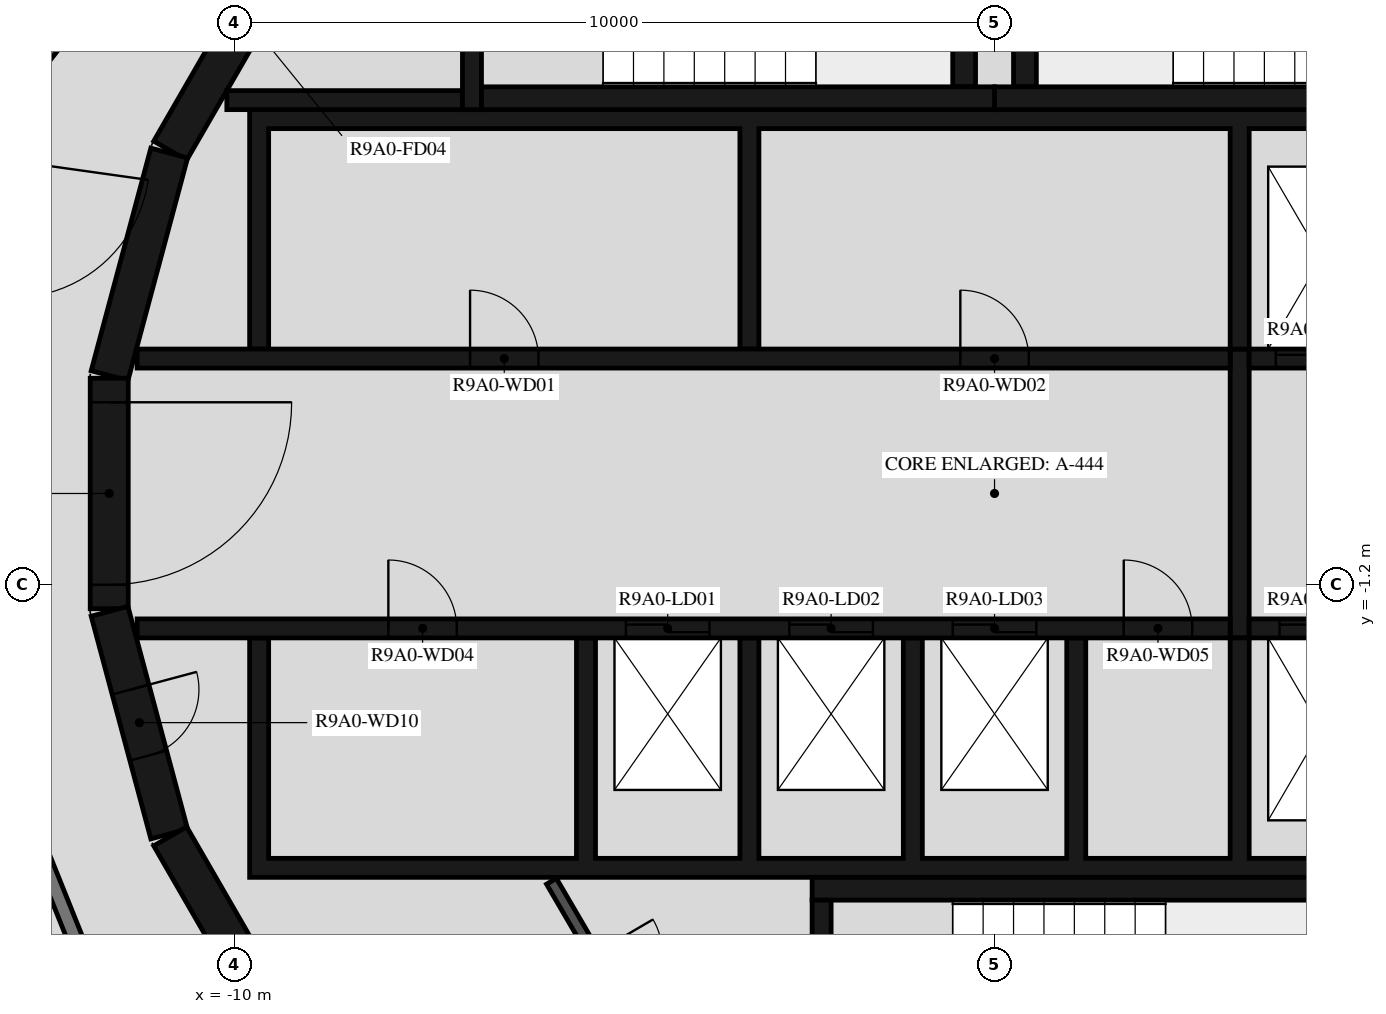
"""IFC4 building model, lengths in metres.
Left out: names, types, materials, properties, quantities, classifications, styles, units other than length and angle.
Written with IfcOpenShell. Run it as: python <this file> out.ifc"""

import sys

from ifc_helpers import new_model, si_unit, direction, frame, frame_2d, origin, place, context, subcontext, project, spatial, polyline, rectangle, outline, extrude, element, fill, save


model = new_model("IFC4")
c1 = context("Model", 3, precision=1e-05, world=origin(), true_north=direction((0.0, 1.0)))
c2 = subcontext(c1, "Body", "Model", "MODEL_VIEW")
j1 = project(units=[si_unit("LENGTHUNIT", "METRE"), si_unit("PLANEANGLEUNIT", "RADIAN")], contexts=[c1])
p1 = place(None, origin())
s1 = spatial("IfcSite", under=j1, at=p1, CompositionType="ELEMENT")
p2 = place(p1, origin())
s2 = spatial("IfcBuilding", under=s1, at=p2, CompositionType="ELEMENT")
p3 = place(p2, frame((0.0, 0.0, 333.0)))
s3 = spatial("IfcBuildingStorey", under=s2, at=p3, CompositionType="ELEMENT", Elevation=333.0)
for number, where, z_axis, x_axis in (
    (1, (-9.329, 7.137, 0.0), (0.0, 0.0, 1.0), (-0.5, -0.866, 0.0)),
    (2, (-10.858, 4.479, 0.0), (0.0, 0.0, 1.0), (-0.259, -0.966, 0.0)),
):
    element("IfcWall", number, at=place(p3, frame(where, z_axis=z_axis, x_axis=x_axis)), inside=s3, PredefinedType="SHEAR", context=c2, shape_type="SweptSolid", body=[
        extrude(rectangle(XDim=3.033, YDim=0.5, at=frame_2d((1.516, 0.0))), origin(), (0.0, 0.0, 1.0), 3.12),
    ])
p4 = place(p3, frame((-11.647, 1.516, 0.0), z_axis=(0.0, 0.0, 1.0), x_axis=(0.0, -1.0, 0.0)))
e3 = element("IfcWall", 3, at=p4, inside=s3, PredefinedType="SHEAR", context=c2, shape_type="SweptSolid", body=[
    extrude(rectangle(XDim=3.033, YDim=0.5, at=frame_2d((1.516, 0.0))), origin(), (0.0, 0.0, 1.0), 3.12),
])
p5 = place(p4, frame((0.316, 0.0, 0.0)))
e4 = element("IfcOpeningElement", 4, at=p5, cuts=e3, PredefinedType="OPENING", context=c2, shape_type="SweptSolid", body=[
    extrude(rectangle(XDim=2.4, YDim=2.1, at=frame_2d((1.2, 1.05))), frame((0.0, 0.26, 0.0), z_axis=(0.0, -1.0, 0.0), x_axis=(1.0, 0.0, 0.0)), (0.0, 0.0, 1.0), 0.52),
])
p6 = place(p3, frame((-11.643, -1.55, 0.0), z_axis=(0.0, 0.0, 1.0), x_axis=(0.258734743916, -0.965948410781, 0.0)))
e5 = element("IfcWall", 5, at=p6, inside=s3, PredefinedType="SHEAR", context=c2, shape_type="SweptSolid", body=[
    extrude(rectangle(XDim=3.033, YDim=0.5, at=frame_2d((1.516, 0.0))), origin(), (0.0, 0.0, 1.0), 3.12),
])
p7 = place(p6, frame((1.066, 0.0, 0.0)))
e6 = element("IfcOpeningElement", 6, at=p7, cuts=e5, PredefinedType="OPENING", context=c2, shape_type="SweptSolid", body=[
    extrude(rectangle(XDim=0.9, YDim=2.1, at=frame_2d((0.45, 1.05))), frame((0.0, 0.26, 0.0), z_axis=(0.0, -1.0, 0.0), x_axis=(1.0, 0.0, 0.0)), (0.0, 0.0, 1.0), 0.52),
])
p8 = place(p3, frame((-10.845, -4.51, 0.0), z_axis=(0.0, 0.0, 1.0), x_axis=(0.500087131594, -0.865975092491, 0.0)))
e7 = element("IfcWall", 7, at=p8, inside=s3, PredefinedType="SHEAR", context=c2, shape_type="SweptSolid", body=[
    extrude(rectangle(XDim=3.033, YDim=0.5, at=frame_2d((1.516, 0.0))), origin(), (0.0, 0.0, 1.0), 3.12),
])
p9 = place(p3, frame((0.0, 5.2, 0.0), z_axis=(0.0, 0.0, 1.0), x_axis=(1.0, 0.0, 0.0)))
e8 = element("IfcWall", 8, at=p9, inside=s3, PredefinedType="SHEAR", context=c2, shape_type="SweptSolid", body=[
    extrude(rectangle(XDim=6.75, YDim=0.3, at=frame_2d((3.375, 0.0))), origin(), (0.0, 0.0, 1.0), 3.12),
])
p10 = place(p3, frame((0.4, 5.35, 0.0), z_axis=(0.0, 0.0, 1.0), x_axis=(0.0, 1.0, 0.0)))
e9 = element("IfcWall", 9, at=p10, inside=s3, PredefinedType="SHEAR", context=c2, shape_type="SweptSolid", body=[
    extrude(rectangle(XDim=3.32, YDim=0.3, at=frame_2d((1.66, 0.0))), origin(), (0.0, 0.0, 1.0), 3.12),
])
p11 = place(p3, frame((-6.75, 5.2, 0.0), z_axis=(0.0, 0.0, 1.0), x_axis=(1.0, 0.0, 0.0)))
e10 = element("IfcWall", 10, at=p11, inside=s3, PredefinedType="SHEAR", context=c2, shape_type="SweptSolid", body=[
    extrude(rectangle(XDim=6.75, YDim=0.3, at=frame_2d((3.375, 0.0))), origin(), (0.0, 0.0, 1.0), 3.12),
])
p12 = place(p3, frame((-0.4, 5.35, 0.0), z_axis=(0.0, 0.0, 1.0), x_axis=(0.0, 1.0, 0.0)))
e11 = element("IfcWall", 11, at=p12, inside=s3, PredefinedType="SHEAR", context=c2, shape_type="SweptSolid", body=[
    extrude(rectangle(XDim=3.32, YDim=0.3, at=frame_2d((1.66, 0.0))), origin(), (0.0, 0.0, 1.0), 3.12),
])
p13 = place(p3, frame((-6.875, 8.97, 0.0), z_axis=(0.0, 0.0, 1.0), x_axis=(0.0, -1.0, 0.0)))
e12 = element("IfcWall", 12, at=p13, inside=s3, PredefinedType="SHEAR", context=c2, shape_type="SweptSolid", body=[
    extrude(rectangle(XDim=3.92, YDim=0.25, at=frame_2d((1.96, 0.0))), origin(), (0.0, 0.0, 1.0), 3.12),
])
p14 = place(p13, frame((1.61, 0.0, 0.0)))
e13 = element("IfcOpeningElement", 13, at=p14, cuts=e12, PredefinedType="OPENING", context=c2, shape_type="SweptSolid", body=[
    extrude(rectangle(XDim=1.2, YDim=2.1, at=frame_2d((0.6, 1.05))), frame((0.0, 0.135, 0.0), z_axis=(0.0, -1.0, 0.0), x_axis=(1.0, 0.0, 0.0)), (0.0, 0.0, 1.0), 0.27),
])
p15 = place(p3, frame((-7.0, 5.175, 0.0), z_axis=(0.0, 0.0, 1.0), x_axis=(-1.0, 0.0, 0.0)))
e14 = element("IfcWall", 14, at=p15, inside=s3, PredefinedType="SHEAR", context=c2, shape_type="SweptSolid", body=[
    extrude(rectangle(XDim=3.1, YDim=0.25, at=frame_2d((1.55, 0.0))), origin(), (0.0, 0.0, 1.0), 3.12),
])
p16 = place(p3, frame((-2.275, -8.67, 0.0), z_axis=(0.0, 0.0, 1.0), x_axis=(0.0, 1.0, 0.0)))
e15 = element("IfcWall", 15, at=p16, inside=s3, PredefinedType="SHEAR", context=c2, shape_type="SweptSolid", body=[
    extrude(rectangle(XDim=3.32, YDim=0.25, at=frame_2d((1.66, 0.0))), origin(), (0.0, 0.0, 1.0), 3.12),
])
p17 = place(p3, frame((-2.4, -5.2, 0.0), z_axis=(0.0, 0.0, 1.0), x_axis=(1.0, 0.0, 0.0)))
e16 = element("IfcWall", 16, at=p17, inside=s3, PredefinedType="SHEAR", context=c2, shape_type="SweptSolid", body=[
    extrude(rectangle(XDim=7.05, YDim=0.3, at=frame_2d((3.525, 0.0))), origin(), (0.0, 0.0, 1.0), 3.12),
])
p18 = place(p3, origin())
e17 = element("IfcWall", 17, at=p18, inside=s3, PredefinedType="SHEAR", context=c2, shape_type="SweptSolid", body=[
    extrude(outline(polyline([(-9.8, 1.9), (-9.55, 1.9), (-9.55, 4.8), (-3.35, 4.8), (-3.35, 1.9), (-3.1, 1.9), (-3.1, 4.8), (3.1, 4.8), (3.1, 1.9), (3.35, 1.9), (3.35, 4.8), (5.25, 4.8), (5.25, 1.9), (5.5, 1.9), (5.5, 4.8), (7.4, 4.8), (7.4, 1.9), (7.65, 1.9), (7.65, 4.8), (9.55, 4.8), (9.55, 1.9), (9.8, 1.9), (9.8, 4.8), (9.8, 5.05), (-9.8, 5.05), (-9.8, 4.8), (-9.8, 1.9)])), origin(), (0.0, 0.0, 1.0), 3.12),
])
p19 = place(p3, origin())
e18 = element("IfcWall", 18, at=p19, inside=s3, PredefinedType="SHEAR", context=c2, shape_type="SweptSolid", body=[
    extrude(outline(polyline([(9.8, -5.05), (9.8, -4.8), (9.8, -1.9), (9.55, -1.9), (9.55, -4.8), (7.65, -4.8), (7.65, -1.9), (7.4, -1.9), (7.4, -4.8), (5.5, -4.8), (5.5, -1.9), (5.25, -1.9), (5.25, -4.8), (3.35, -4.8), (3.35, -1.9), (3.1, -1.9), (3.1, -4.8), (1.2, -4.8), (1.2, -1.9), (0.95, -1.9), (0.95, -4.8), (-0.95, -4.8), (-0.95, -1.9), (-1.2, -1.9), (-1.2, -4.8), (-3.1, -4.8), (-3.1, -1.9), (-3.35, -1.9), (-3.35, -4.8), (-5.25, -4.8), (-5.25, -1.9), (-5.5, -1.9), (-5.5, -4.8), (-9.55, -4.8), (-9.55, -1.9), (-9.8, -1.9), (-9.8, -4.8), (-9.8, -5.05), (9.8, -5.05)])), origin(), (0.0, 0.0, 1.0), 3.12),
])
p20 = place(p3, frame((-11.28, 1.775, 0.0), z_axis=(0.0, 0.0, 1.0), x_axis=(1.0, 0.0, 0.0)))
e19 = element("IfcWall", 19, at=p20, inside=s3, PredefinedType="SHEAR", context=c2, shape_type="SweptSolid", body=[
    extrude(rectangle(XDim=14.38, YDim=0.25, at=frame_2d((7.19, 0.0))), origin(), (0.0, 0.0, 1.0), 3.12),
])
p21 = place(p20, frame((4.38, 0.0, 0.0)))
e20 = element("IfcOpeningElement", 20, at=p21, cuts=e19, PredefinedType="OPENING", context=c2, shape_type="SweptSolid", body=[
    extrude(rectangle(XDim=0.9, YDim=2.1, at=frame_2d((0.45, 1.05))), frame((0.0, 0.135, 0.0), z_axis=(0.0, -1.0, 0.0), x_axis=(1.0, 0.0, 0.0)), (0.0, 0.0, 1.0), 0.27),
])
p22 = place(p20, frame((10.83, 0.0, 0.0)))
e21 = element("IfcOpeningElement", 21, at=p22, cuts=e19, PredefinedType="OPENING", context=c2, shape_type="SweptSolid", body=[
    extrude(rectangle(XDim=0.9, YDim=2.1, at=frame_2d((0.45, 1.05))), frame((0.0, 0.135, 0.0), z_axis=(0.0, -1.0, 0.0), x_axis=(1.0, 0.0, 0.0)), (0.0, 0.0, 1.0), 0.27),
])
p23 = place(p3, frame((3.35, 1.775, 0.0), z_axis=(0.0, 0.0, 1.0), x_axis=(1.0, 0.0, 0.0)))
e22 = element("IfcWall", 22, at=p23, inside=s3, PredefinedType="SHEAR", context=c2, shape_type="SweptSolid", body=[
    extrude(rectangle(XDim=7.93, YDim=0.25, at=frame_2d((3.965, 0.0))), origin(), (0.0, 0.0, 1.0), 3.12),
])
p24 = place(p23, frame((0.35, 0.0, 0.0)))
e23 = element("IfcOpeningElement", 23, at=p24, cuts=e22, PredefinedType="OPENING", context=c2, shape_type="SweptSolid", body=[
    extrude(rectangle(XDim=1.2, YDim=2.4, at=frame_2d((0.6, 1.2))), frame((0.0, 0.135, 0.0), z_axis=(0.0, -1.0, 0.0), x_axis=(1.0, 0.0, 0.0)), (0.0, 0.0, 1.0), 0.27),
])
p25 = place(p23, frame((2.5, 0.0, 0.0)))
e24 = element("IfcOpeningElement", 24, at=p25, cuts=e22, PredefinedType="OPENING", context=c2, shape_type="SweptSolid", body=[
    extrude(rectangle(XDim=1.2, YDim=2.4, at=frame_2d((0.6, 1.2))), frame((0.0, 0.135, 0.0), z_axis=(0.0, -1.0, 0.0), x_axis=(1.0, 0.0, 0.0)), (0.0, 0.0, 1.0), 0.27),
])
p26 = place(p23, frame((4.8, 0.0, 0.0)))
e25 = element("IfcOpeningElement", 25, at=p26, cuts=e22, PredefinedType="OPENING", context=c2, shape_type="SweptSolid", body=[
    extrude(rectangle(XDim=0.9, YDim=2.1, at=frame_2d((0.45, 1.05))), frame((0.0, 0.135, 0.0), z_axis=(0.0, -1.0, 0.0), x_axis=(1.0, 0.0, 0.0)), (0.0, 0.0, 1.0), 0.27),
])
p27 = place(p3, frame((-11.28, -1.775, 0.0), z_axis=(0.0, 0.0, 1.0), x_axis=(1.0, 0.0, 0.0)))
e26 = element("IfcWall", 26, at=p27, inside=s3, PredefinedType="SHEAR", context=c2, shape_type="SweptSolid", body=[
    extrude(rectangle(XDim=14.38, YDim=0.25, at=frame_2d((7.19, 0.0))), origin(), (0.0, 0.0, 1.0), 3.12),
])
p28 = place(p27, frame((6.43, 0.0, 0.0)))
e27 = element("IfcOpeningElement", 27, at=p28, cuts=e26, PredefinedType="OPENING", context=c2, shape_type="SweptSolid", body=[
    extrude(rectangle(XDim=1.1, YDim=2.1, at=frame_2d((0.55, 1.05))), frame((0.0, 0.135, 0.0), z_axis=(0.0, -1.0, 0.0), x_axis=(1.0, 0.0, 0.0)), (0.0, 0.0, 1.0), 0.27),
])
p29 = place(p27, frame((8.58, 0.0, 0.0)))
e28 = element("IfcOpeningElement", 28, at=p29, cuts=e26, PredefinedType="OPENING", context=c2, shape_type="SweptSolid", body=[
    extrude(rectangle(XDim=1.1, YDim=2.1, at=frame_2d((0.55, 1.05))), frame((0.0, 0.135, 0.0), z_axis=(0.0, -1.0, 0.0), x_axis=(1.0, 0.0, 0.0)), (0.0, 0.0, 1.0), 0.27),
])
p30 = place(p27, frame((10.73, 0.0, 0.0)))
e29 = element("IfcOpeningElement", 29, at=p30, cuts=e26, PredefinedType="OPENING", context=c2, shape_type="SweptSolid", body=[
    extrude(rectangle(XDim=1.1, YDim=2.1, at=frame_2d((0.55, 1.05))), frame((0.0, 0.135, 0.0), z_axis=(0.0, -1.0, 0.0), x_axis=(1.0, 0.0, 0.0)), (0.0, 0.0, 1.0), 0.27),
])
p31 = place(p27, frame((3.305, 0.0, 0.0)))
e30 = element("IfcOpeningElement", 30, at=p31, cuts=e26, PredefinedType="OPENING", context=c2, shape_type="SweptSolid", body=[
    extrude(rectangle(XDim=0.9, YDim=2.1, at=frame_2d((0.45, 1.05))), frame((0.0, 0.135, 0.0), z_axis=(0.0, -1.0, 0.0), x_axis=(1.0, 0.0, 0.0)), (0.0, 0.0, 1.0), 0.27),
])
p32 = place(p27, frame((12.98, 0.0, 0.0)))
e31 = element("IfcOpeningElement", 31, at=p32, cuts=e26, PredefinedType="OPENING", context=c2, shape_type="SweptSolid", body=[
    extrude(rectangle(XDim=0.9, YDim=2.1, at=frame_2d((0.45, 1.05))), frame((0.0, 0.135, 0.0), z_axis=(0.0, -1.0, 0.0), x_axis=(1.0, 0.0, 0.0)), (0.0, 0.0, 1.0), 0.27),
])
p33 = place(p3, frame((3.35, -1.775, 0.0), z_axis=(0.0, 0.0, 1.0), x_axis=(1.0, 0.0, 0.0)))
e32 = element("IfcWall", 32, at=p33, inside=s3, PredefinedType="SHEAR", context=c2, shape_type="SweptSolid", body=[
    extrude(rectangle(XDim=7.93, YDim=0.25, at=frame_2d((3.965, 0.0))), origin(), (0.0, 0.0, 1.0), 3.12),
])
p34 = place(p33, frame((0.4, 0.0, 0.0)))
e33 = element("IfcOpeningElement", 33, at=p34, cuts=e32, PredefinedType="OPENING", context=c2, shape_type="SweptSolid", body=[
    extrude(rectangle(XDim=1.1, YDim=2.4, at=frame_2d((0.55, 1.2))), frame((0.0, 0.135, 0.0), z_axis=(0.0, -1.0, 0.0), x_axis=(1.0, 0.0, 0.0)), (0.0, 0.0, 1.0), 0.27),
])
p35 = place(p33, frame((2.55, 0.0, 0.0)))
e34 = element("IfcOpeningElement", 34, at=p35, cuts=e32, PredefinedType="OPENING", context=c2, shape_type="SweptSolid", body=[
    extrude(rectangle(XDim=1.1, YDim=2.4, at=frame_2d((0.55, 1.2))), frame((0.0, 0.135, 0.0), z_axis=(0.0, -1.0, 0.0), x_axis=(1.0, 0.0, 0.0)), (0.0, 0.0, 1.0), 0.27),
])
p36 = place(p33, frame((4.7, 0.0, 0.0)))
e35 = element("IfcOpeningElement", 35, at=p36, cuts=e32, PredefinedType="OPENING", context=c2, shape_type="SweptSolid", body=[
    extrude(rectangle(XDim=1.1, YDim=2.4, at=frame_2d((0.55, 1.2))), frame((0.0, 0.135, 0.0), z_axis=(0.0, -1.0, 0.0), x_axis=(1.0, 0.0, 0.0)), (0.0, 0.0, 1.0), 0.27),
])
p37 = place(p3, frame((3.225, -1.9, 0.0), z_axis=(0.0, 0.0, 1.0), x_axis=(0.0, 1.0, 0.0)))
e36 = element("IfcWall", 36, at=p37, inside=s3, PredefinedType="SHEAR", context=c2, shape_type="SweptSolid", body=[
    extrude(rectangle(XDim=3.8, YDim=0.25, at=frame_2d((1.9, 0.0))), origin(), (0.0, 0.0, 1.0), 3.12),
])
p38 = place(p3, frame((-5.829, -5.102, 0.0), z_axis=(0.0, 0.0, 1.0), x_axis=(0.504480008384, -0.863423373057, 0.0)))
e37 = element("IfcWall", 37, at=p38, inside=s3, PredefinedType="PARTITIONING", context=c2, shape_type="SweptSolid", body=[
    extrude(rectangle(XDim=3.115, YDim=0.15, at=frame_2d((1.558, 0.0))), origin(), (0.0, 0.0, 1.0), 3.12),
])
p39 = place(p38, frame((1.107, 0.0, 0.0)))
e38 = element("IfcOpeningElement", 38, at=p39, cuts=e37, PredefinedType="OPENING", context=c2, shape_type="SweptSolid", body=[
    extrude(rectangle(XDim=0.9, YDim=2.1, at=frame_2d((0.45, 1.05))), frame((0.0, 0.085, 0.0), z_axis=(0.0, -1.0, 0.0), x_axis=(1.0, 0.0, 0.0)), (0.0, 0.0, 1.0), 0.17),
])
p40 = place(p3, frame((-13.769, -1.691, 0.0), z_axis=(0.0, 0.0, 1.0), x_axis=(0.372720094028, -0.927943819155, 0.0)))
e39 = element("IfcWall", 39, at=p40, inside=s3, PredefinedType="STANDARD", context=c2, shape_type="SweptSolid", body=[
    extrude(rectangle(XDim=4.875, YDim=0.2, at=frame_2d((2.438, 0.0))), origin(), (0.0, 0.0, 1.0), 3.12),
])
p41 = place(p3, frame((-8.349, 11.079, 0.0), z_axis=(0.0, 0.0, 1.0), x_axis=(-0.615669112324, -0.78800478687, 0.0)))
e40 = element("IfcWall", 40, at=p41, inside=s3, PredefinedType="STANDARD", context=c2, shape_type="SweptSolid", body=[
    extrude(rectangle(XDim=7.181, YDim=0.2, at=frame_2d((3.591, 0.0))), origin(), (0.0, 0.0, 1.0), 3.12),
])
p42 = place(p41, frame((2.1, 0.0, 0.0)))
e41 = element("IfcOpeningElement", 41, at=p42, cuts=e40, PredefinedType="OPENING", context=c2, shape_type="SweptSolid", body=[
    extrude(rectangle(XDim=1.0, YDim=2.1, at=frame_2d((0.5, 1.05))), frame((0.0, 0.11, 0.0), z_axis=(0.0, -1.0, 0.0), x_axis=(1.0, 0.0, 0.0)), (0.0, 0.0, 1.0), 0.22),
])
p43 = place(p41, frame((3.811, 0.0, 0.0)))
e42 = element("IfcOpeningElement", 42, at=p43, cuts=e40, PredefinedType="OPENING", context=c2, shape_type="SweptSolid", body=[
    extrude(rectangle(XDim=1.0, YDim=2.1, at=frame_2d((0.5, 1.05))), frame((0.0, 0.11, 0.0), z_axis=(0.0, -1.0, 0.0), x_axis=(1.0, 0.0, 0.0)), (0.0, 0.0, 1.0), 0.22),
])
p44 = place(p5, origin())
e43 = element("IfcDoor", 43, at=p44, inside=s3, OperationType="DOUBLE_DOOR_SINGLE_SWING", PredefinedType="DOOR", context=c2, shape_type="SweptSolid", body=[
    extrude(rectangle(XDim=2.4, YDim=2.1, at=frame_2d((1.2, 1.05))), frame((0.0, 0.025, 0.0), z_axis=(0.0, -1.0, 0.0), x_axis=(1.0, 0.0, 0.0)), (0.0, 0.0, 1.0), 0.05),
])
fill(e4, e43)
p45 = place(p24, origin())
e44 = element("IfcDoor", 44, at=p45, inside=s3, OperationType="DOUBLE_DOOR_SLIDING", PredefinedType="DOOR", context=c2, shape_type="SweptSolid", body=[
    extrude(rectangle(XDim=1.2, YDim=2.4, at=frame_2d((0.6, 1.2))), frame((0.0, 0.025, 0.0), z_axis=(0.0, -1.0, 0.0), x_axis=(1.0, 0.0, 0.0)), (0.0, 0.0, 1.0), 0.05),
])
fill(e23, e44)
p46 = place(p28, origin())
e45 = element("IfcDoor", 45, at=p46, inside=s3, OperationType="DOUBLE_DOOR_SLIDING", PredefinedType="DOOR", context=c2, shape_type="SweptSolid", body=[
    extrude(rectangle(XDim=1.1, YDim=2.1, at=frame_2d((0.55, 1.05))), frame((0.0, 0.025, 0.0), z_axis=(0.0, -1.0, 0.0), x_axis=(1.0, 0.0, 0.0)), (0.0, 0.0, 1.0), 0.05),
])
fill(e27, e45)
p47 = place(p29, origin())
e46 = element("IfcDoor", 46, at=p47, inside=s3, OperationType="DOUBLE_DOOR_SLIDING", PredefinedType="DOOR", context=c2, shape_type="SweptSolid", body=[
    extrude(rectangle(XDim=1.1, YDim=2.1, at=frame_2d((0.55, 1.05))), frame((0.0, 0.025, 0.0), z_axis=(0.0, -1.0, 0.0), x_axis=(1.0, 0.0, 0.0)), (0.0, 0.0, 1.0), 0.05),
])
fill(e28, e46)
p48 = place(p30, origin())
e47 = element("IfcDoor", 47, at=p48, inside=s3, OperationType="DOUBLE_DOOR_SLIDING", PredefinedType="DOOR", context=c2, shape_type="SweptSolid", body=[
    extrude(rectangle(XDim=1.1, YDim=2.1, at=frame_2d((0.55, 1.05))), frame((0.0, 0.025, 0.0), z_axis=(0.0, -1.0, 0.0), x_axis=(1.0, 0.0, 0.0)), (0.0, 0.0, 1.0), 0.05),
])
fill(e29, e47)
p49 = place(p34, origin())
e48 = element("IfcDoor", 48, at=p49, inside=s3, OperationType="DOUBLE_DOOR_SLIDING", PredefinedType="DOOR", context=c2, shape_type="SweptSolid", body=[
    extrude(rectangle(XDim=1.1, YDim=2.4, at=frame_2d((0.55, 1.2))), frame((0.0, 0.025, 0.0), z_axis=(0.0, -1.0, 0.0), x_axis=(1.0, 0.0, 0.0)), (0.0, 0.0, 1.0), 0.05),
])
fill(e33, e48)
p50 = place(p21, origin())
e49 = element("IfcDoor", 49, at=p50, inside=s3, OperationType="SINGLE_SWING_LEFT", PredefinedType="DOOR", context=c2, shape_type="SweptSolid", body=[
    extrude(rectangle(XDim=0.9, YDim=2.1, at=frame_2d((0.45, 1.05))), frame((0.0, 0.025, 0.0), z_axis=(0.0, -1.0, 0.0), x_axis=(1.0, 0.0, 0.0)), (0.0, 0.0, 1.0), 0.05),
])
fill(e20, e49)
p51 = place(p22, origin())
e50 = element("IfcDoor", 50, at=p51, inside=s3, OperationType="SINGLE_SWING_RIGHT", PredefinedType="DOOR", context=c2, shape_type="SweptSolid", body=[
    extrude(rectangle(XDim=0.9, YDim=2.1, at=frame_2d((0.45, 1.05))), frame((0.0, 0.025, 0.0), z_axis=(0.0, -1.0, 0.0), x_axis=(1.0, 0.0, 0.0)), (0.0, 0.0, 1.0), 0.05),
])
fill(e21, e50)
p52 = place(p31, origin())
e51 = element("IfcDoor", 51, at=p52, inside=s3, OperationType="SINGLE_SWING_RIGHT", PredefinedType="DOOR", context=c2, shape_type="SweptSolid", body=[
    extrude(rectangle(XDim=0.9, YDim=2.1, at=frame_2d((0.45, 1.05))), frame((0.0, 0.025, 0.0), z_axis=(0.0, -1.0, 0.0), x_axis=(1.0, 0.0, 0.0)), (0.0, 0.0, 1.0), 0.05),
])
fill(e30, e51)
p53 = place(p32, origin())
e52 = element("IfcDoor", 52, at=p53, inside=s3, OperationType="SINGLE_SWING_LEFT", PredefinedType="DOOR", context=c2, shape_type="SweptSolid", body=[
    extrude(rectangle(XDim=0.9, YDim=2.1, at=frame_2d((0.45, 1.05))), frame((0.0, 0.025, 0.0), z_axis=(0.0, -1.0, 0.0), x_axis=(1.0, 0.0, 0.0)), (0.0, 0.0, 1.0), 0.05),
])
fill(e31, e52)
p54 = place(p7, origin())
e53 = element("IfcDoor", 53, at=p54, inside=s3, OperationType="SINGLE_SWING_RIGHT", PredefinedType="DOOR", context=c2, shape_type="SweptSolid", body=[
    extrude(rectangle(XDim=0.9, YDim=2.1, at=frame_2d((0.45, 1.05))), frame((0.0, 0.025, 0.0), z_axis=(0.0, -1.0, 0.0), x_axis=(1.0, 0.0, 0.0)), (0.0, 0.0, 1.0), 0.05),
])
fill(e6, e53)
save(model, sys.argv[1])
